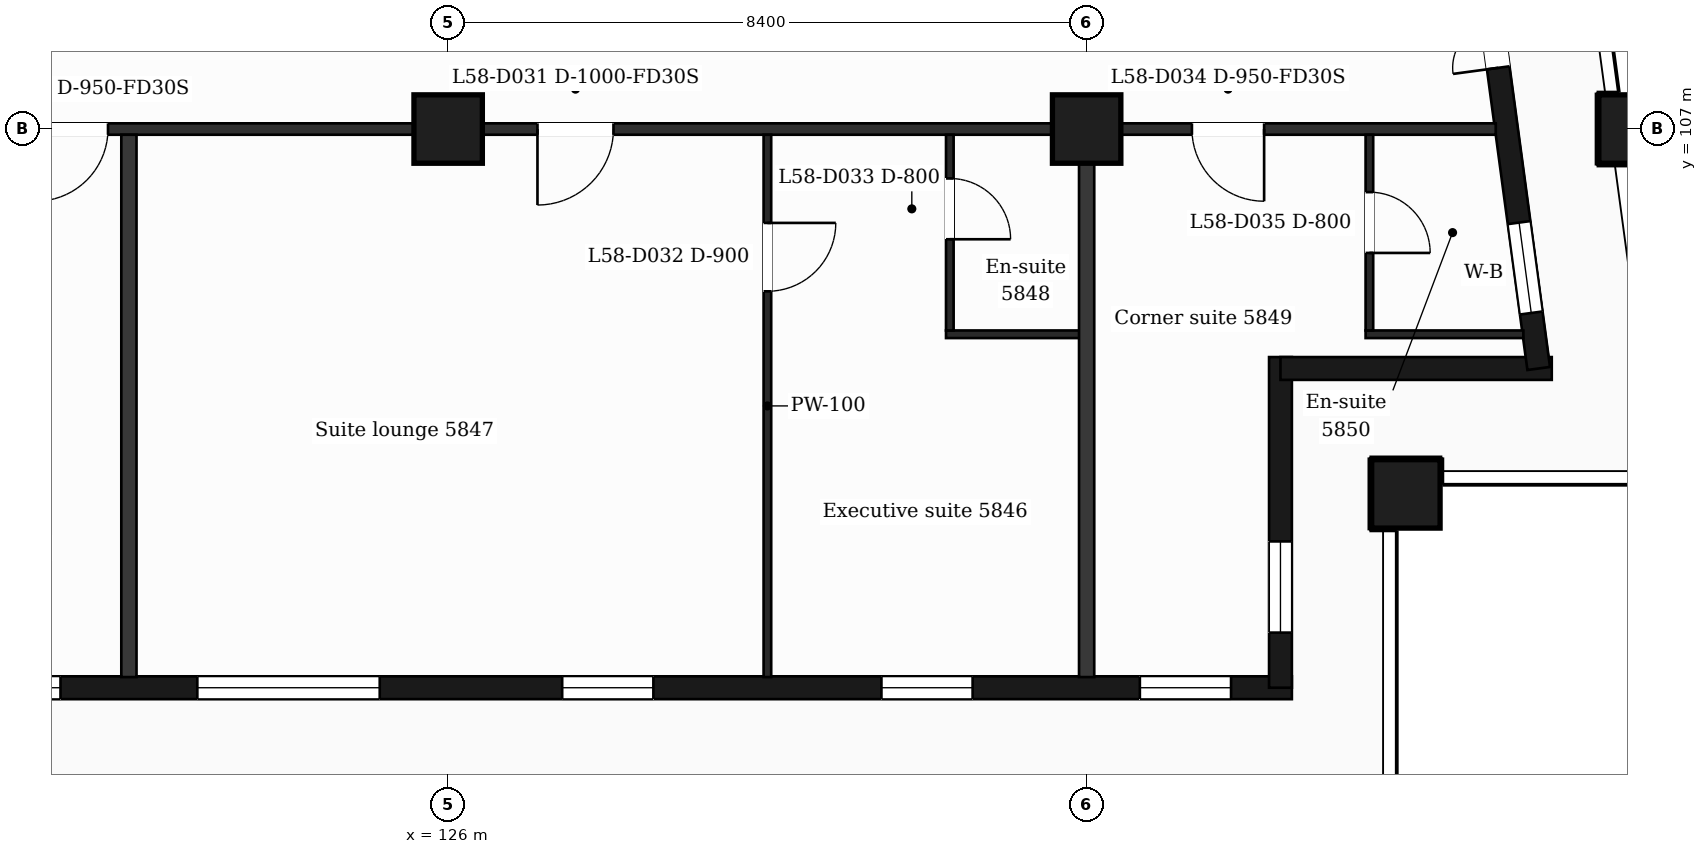
"""IFC4 building model, lengths in metres.
Left out: names, types, materials, properties, quantities, classifications, styles, units other than length and angle.
Written with IfcOpenShell. Run it as: python <this file> out.ifc"""

import sys

from ifc_helpers import new_model, si_unit, direction, frame, frame_2d, origin, origin_2d, place, context, subcontext, project, spatial, rectangle, extrude, element, fill, save


model = new_model("IFC4")
c1 = context("Model", 3, precision=1e-05, world=origin(), true_north=direction((0.0, 1.0)))
c2 = subcontext(c1, "Body", "Model", "MODEL_VIEW")
j1 = project(units=[si_unit("LENGTHUNIT", "METRE"), si_unit("PLANEANGLEUNIT", "RADIAN")], contexts=[c1])
p1 = place(None, origin())
s1 = spatial("IfcSite", under=j1, at=p1, CompositionType="ELEMENT")
p2 = place(p1, origin())
s2 = spatial("IfcBuilding", under=s1, at=p2, CompositionType="ELEMENT")
p3 = place(p2, frame((0.0, 0.0, 239.2)))
s3 = spatial("IfcBuildingStorey", under=s2, at=p3, CompositionType="ELEMENT", Elevation=239.2)
for number, where, z_axis, x_axis in (
    (1, (138.6, 102.2, 0.0), (0.0, 0.0, 1.0), (1.0, 0.0, 0.0)),
    (2, (126.0, 107.0, 0.0), (0.0, 0.0, 1.0), (1.0, 0.0, 0.0)),
    (3, (134.4, 107.0, 0.0), (0.0, 0.0, 1.0), (1.0, 0.0, 0.0)),
    (4, (141.588, 107.0, 0.0), (0.0, 0.0, 1.0), (1.0, 0.0, 0.0)),
):
    element("IfcColumn", number, at=place(p3, frame(where, z_axis=z_axis, x_axis=x_axis)), inside=s3, PredefinedType="COLUMN", context=c2, shape_type="SweptSolid", body=[
        extrude(rectangle(XDim=0.9, YDim=0.9, at=origin_2d()), origin(), (0.0, 0.0, 1.0), 3.7),
    ])
p4 = place(p3, frame((89.85, 99.65, 0.0), z_axis=(0.0, 0.0, 1.0), x_axis=(1.0, 0.0, 0.0)))
e5 = element("IfcWall", 5, at=p4, inside=s3, PredefinedType="SOLIDWALL", context=c2, shape_type="SweptSolid", body=[
    extrude(rectangle(XDim=47.25, YDim=0.3, at=frame_2d((23.625, 0.0))), origin(), (0.0, 0.0, 1.0), 3.38),
])
p5 = place(p4, frame((0.725, 0.0, 0.9)))
e6 = element("IfcOpeningElement", 6, at=p5, cuts=e5, PredefinedType="OPENING", context=c2, shape_type="SweptSolid", body=[
    extrude(rectangle(XDim=1.2, YDim=2.1, at=frame_2d((0.6, 1.05))), frame((0.0, 0.16, 0.0), z_axis=(0.0, -1.0, 0.0), x_axis=(1.0, 0.0, 0.0)), (0.0, 0.0, 1.0), 0.32),
])
p6 = place(p4, frame((3.45, 0.0, 0.9)))
e7 = element("IfcOpeningElement", 7, at=p6, cuts=e5, PredefinedType="OPENING", context=c2, shape_type="SweptSolid", body=[
    extrude(rectangle(XDim=2.4, YDim=2.1, at=frame_2d((1.2, 1.05))), frame((0.0, 0.16, 0.0), z_axis=(0.0, -1.0, 0.0), x_axis=(1.0, 0.0, 0.0)), (0.0, 0.0, 1.0), 0.32),
])
p7 = place(p4, frame((8.25, 0.0, 0.9)))
e8 = element("IfcOpeningElement", 8, at=p7, cuts=e5, PredefinedType="OPENING", context=c2, shape_type="SweptSolid", body=[
    extrude(rectangle(XDim=1.2, YDim=2.1, at=frame_2d((0.6, 1.05))), frame((0.0, 0.16, 0.0), z_axis=(0.0, -1.0, 0.0), x_axis=(1.0, 0.0, 0.0)), (0.0, 0.0, 1.0), 0.32),
])
p8 = place(p4, frame((12.45, 0.0, 0.9)))
e9 = element("IfcOpeningElement", 9, at=p8, cuts=e5, PredefinedType="OPENING", context=c2, shape_type="SweptSolid", body=[
    extrude(rectangle(XDim=1.2, YDim=2.1, at=frame_2d((0.6, 1.05))), frame((0.0, 0.16, 0.0), z_axis=(0.0, -1.0, 0.0), x_axis=(1.0, 0.0, 0.0)), (0.0, 0.0, 1.0), 0.32),
])
p9 = place(p4, frame((16.05, 0.0, 0.9)))
e10 = element("IfcOpeningElement", 10, at=p9, cuts=e5, PredefinedType="OPENING", context=c2, shape_type="SweptSolid", body=[
    extrude(rectangle(XDim=2.4, YDim=2.1, at=frame_2d((1.2, 1.05))), frame((0.0, 0.16, 0.0), z_axis=(0.0, -1.0, 0.0), x_axis=(1.0, 0.0, 0.0)), (0.0, 0.0, 1.0), 0.32),
])
p10 = place(p4, frame((20.25, 0.0, 0.9)))
e11 = element("IfcOpeningElement", 11, at=p10, cuts=e5, PredefinedType="OPENING", context=c2, shape_type="SweptSolid", body=[
    extrude(rectangle(XDim=2.4, YDim=2.1, at=frame_2d((1.2, 1.05))), frame((0.0, 0.16, 0.0), z_axis=(0.0, -1.0, 0.0), x_axis=(1.0, 0.0, 0.0)), (0.0, 0.0, 1.0), 0.32),
])
p11 = place(p4, frame((25.05, 0.0, 0.0)))
e12 = element("IfcOpeningElement", 12, at=p11, cuts=e5, PredefinedType="OPENING", context=c2, shape_type="SweptSolid", body=[
    extrude(rectangle(XDim=1.2, YDim=2.4, at=frame_2d((0.6, 1.2))), frame((0.0, 0.16, 0.0), z_axis=(0.0, -1.0, 0.0), x_axis=(1.0, 0.0, 0.0)), (0.0, 0.0, 1.0), 0.32),
])
p12 = place(p4, frame((28.65, 0.0, 0.9)))
e13 = element("IfcOpeningElement", 13, at=p12, cuts=e5, PredefinedType="OPENING", context=c2, shape_type="SweptSolid", body=[
    extrude(rectangle(XDim=2.4, YDim=2.1, at=frame_2d((1.2, 1.05))), frame((0.0, 0.16, 0.0), z_axis=(0.0, -1.0, 0.0), x_axis=(1.0, 0.0, 0.0)), (0.0, 0.0, 1.0), 0.32),
])
p13 = place(p4, frame((32.85, 0.0, 0.9)))
e14 = element("IfcOpeningElement", 14, at=p13, cuts=e5, PredefinedType="OPENING", context=c2, shape_type="SweptSolid", body=[
    extrude(rectangle(XDim=2.4, YDim=2.1, at=frame_2d((1.2, 1.05))), frame((0.0, 0.16, 0.0), z_axis=(0.0, -1.0, 0.0), x_axis=(1.0, 0.0, 0.0)), (0.0, 0.0, 1.0), 0.32),
])
p14 = place(p4, frame((37.65, 0.0, 0.9)))
e15 = element("IfcOpeningElement", 15, at=p14, cuts=e5, PredefinedType="OPENING", context=c2, shape_type="SweptSolid", body=[
    extrude(rectangle(XDim=1.2, YDim=2.1, at=frame_2d((0.6, 1.05))), frame((0.0, 0.16, 0.0), z_axis=(0.0, -1.0, 0.0), x_axis=(1.0, 0.0, 0.0)), (0.0, 0.0, 1.0), 0.32),
])
p15 = place(p4, frame((41.85, 0.0, 0.9)))
e16 = element("IfcOpeningElement", 16, at=p15, cuts=e5, PredefinedType="OPENING", context=c2, shape_type="SweptSolid", body=[
    extrude(rectangle(XDim=1.2, YDim=2.1, at=frame_2d((0.6, 1.05))), frame((0.0, 0.16, 0.0), z_axis=(0.0, -1.0, 0.0), x_axis=(1.0, 0.0, 0.0)), (0.0, 0.0, 1.0), 0.32),
])
p16 = place(p4, frame((45.25, 0.0, 0.9)))
e17 = element("IfcOpeningElement", 17, at=p16, cuts=e5, PredefinedType="OPENING", context=c2, shape_type="SweptSolid", body=[
    extrude(rectangle(XDim=1.2, YDim=2.1, at=frame_2d((0.6, 1.05))), frame((0.0, 0.16, 0.0), z_axis=(0.0, -1.0, 0.0), x_axis=(1.0, 0.0, 0.0)), (0.0, 0.0, 1.0), 0.32),
])
p17 = place(p3, frame((136.95, 99.65, 0.0), z_axis=(0.0, 0.0, 1.0), x_axis=(0.0, 1.0, 0.0)))
e18 = element("IfcWall", 18, at=p17, inside=s3, PredefinedType="SOLIDWALL", context=c2, shape_type="SweptSolid", body=[
    extrude(rectangle(XDim=4.35, YDim=0.3, at=frame_2d((2.175, 0.0))), origin(), (0.0, 0.0, 1.0), 3.38),
])
p18 = place(p17, frame((0.725, 0.0, 0.9)))
e19 = element("IfcOpeningElement", 19, at=p18, cuts=e18, PredefinedType="OPENING", context=c2, shape_type="SweptSolid", body=[
    extrude(rectangle(XDim=1.2, YDim=2.1, at=frame_2d((0.6, 1.05))), frame((0.0, 0.16, 0.0), z_axis=(0.0, -1.0, 0.0), x_axis=(1.0, 0.0, 0.0)), (0.0, 0.0, 1.0), 0.32),
])
p19 = place(p3, frame((136.95, 103.85, 0.0), z_axis=(0.0, 0.0, 1.0), x_axis=(1.0, 0.0, 0.0)))
e20 = element("IfcWall", 20, at=p19, inside=s3, PredefinedType="SOLIDWALL", context=c2, shape_type="SweptSolid", body=[
    extrude(rectangle(XDim=3.569, YDim=0.3, at=frame_2d((1.785, 0.0))), origin(), (0.0, 0.0, 1.0), 3.38),
])
p20 = place(p3, frame((140.348, 103.85, 0.0), z_axis=(0.0, 0.0, 1.0), x_axis=(-0.133431549479, 0.991058031401, 0.0)))
e21 = element("IfcWall", 21, at=p20, inside=s3, PredefinedType="SOLIDWALL", context=c2, shape_type="SweptSolid", body=[
    extrude(rectangle(XDim=6.609, YDim=0.3, at=frame_2d((3.304, 0.0))), origin(), (0.0, 0.0, 1.0), 3.38),
])
p21 = place(p20, frame((0.737, 0.0, 0.9)))
e22 = element("IfcOpeningElement", 22, at=p21, cuts=e21, PredefinedType="OPENING", context=c2, shape_type="SweptSolid", body=[
    extrude(rectangle(XDim=1.2, YDim=2.1, at=frame_2d((0.6, 1.05))), frame((0.0, 0.16, 0.0), z_axis=(0.0, -1.0, 0.0), x_axis=(1.0, 0.0, 0.0)), (0.0, 0.0, 1.0), 0.32),
])
p22 = place(p20, frame((3.991, 0.0, 0.0)))
e23 = element("IfcOpeningElement", 23, at=p22, cuts=e21, PredefinedType="OPENING", context=c2, shape_type="SweptSolid", body=[
    extrude(rectangle(XDim=1.2, YDim=2.4, at=frame_2d((0.6, 1.2))), frame((0.0, 0.16, 0.0), z_axis=(0.0, -1.0, 0.0), x_axis=(1.0, 0.0, 0.0)), (0.0, 0.0, 1.0), 0.32),
])
p23 = place(p3, frame((132.55, 104.3, 0.0), z_axis=(0.0, 0.0, 1.0), x_axis=(1.0, 0.0, 0.0)))
e24 = element("IfcWall", 24, at=p23, inside=s3, PredefinedType="PARTITIONING", context=c2, shape_type="SweptSolid", body=[
    extrude(rectangle(XDim=1.85, YDim=0.1, at=frame_2d((0.925, 0.0))), origin(), (0.0, 0.0, 1.0), 3.38),
])
p24 = place(p3, frame((138.07, 104.3, 0.0), z_axis=(0.0, 0.0, 1.0), x_axis=(1.0, 0.0, 0.0)))
e25 = element("IfcWall", 25, at=p24, inside=s3, PredefinedType="PARTITIONING", context=c2, shape_type="SweptSolid", body=[
    extrude(rectangle(XDim=2.076, YDim=0.1, at=frame_2d((1.038, 0.0))), origin(), (0.0, 0.0, 1.0), 3.38),
])
p25 = place(p3, frame((87.018, 107.0, 0.0), z_axis=(0.0, 0.0, 1.0), x_axis=(1.0, 0.0, 0.0)))
e26 = element("IfcWall", 26, at=p25, inside=s3, PredefinedType="PARTITIONING", context=c2, shape_type="SweptSolid", body=[
    extrude(rectangle(XDim=52.765, YDim=0.15, at=frame_2d((26.382, 0.0))), origin(), (0.0, 0.0, 1.0), 3.38),
])
p26 = place(p25, frame((0.87, 0.0, 0.0)))
e27 = element("IfcOpeningElement", 27, at=p26, cuts=e26, PredefinedType="OPENING", context=c2, shape_type="SweptSolid", body=[
    extrude(rectangle(XDim=0.95, YDim=2.1, at=frame_2d((0.475, 1.05))), frame((0.0, 0.085, 0.0), z_axis=(0.0, -1.0, 0.0), x_axis=(1.0, 0.0, 0.0)), (0.0, 0.0, 1.0), 0.17),
])
p27 = place(p25, frame((7.757, 0.0, 0.0)))
e28 = element("IfcOpeningElement", 28, at=p27, cuts=e26, PredefinedType="OPENING", context=c2, shape_type="SweptSolid", body=[
    extrude(rectangle(XDim=0.95, YDim=2.1, at=frame_2d((0.475, 1.05))), frame((0.0, 0.085, 0.0), z_axis=(0.0, -1.0, 0.0), x_axis=(1.0, 0.0, 0.0)), (0.0, 0.0, 1.0), 0.17),
])
p28 = place(p25, frame((16.57, 0.0, 0.0)))
e29 = element("IfcOpeningElement", 29, at=p28, cuts=e26, PredefinedType="OPENING", context=c2, shape_type="SweptSolid", body=[
    extrude(rectangle(XDim=0.95, YDim=2.1, at=frame_2d((0.475, 1.05))), frame((0.0, 0.085, 0.0), z_axis=(0.0, -1.0, 0.0), x_axis=(1.0, 0.0, 0.0)), (0.0, 0.0, 1.0), 0.17),
])
p29 = place(p25, frame((18.782, 0.0, 0.0)))
e30 = element("IfcOpeningElement", 30, at=p29, cuts=e26, PredefinedType="OPENING", context=c2, shape_type="SweptSolid", body=[
    extrude(rectangle(XDim=0.95, YDim=2.1, at=frame_2d((0.475, 1.05))), frame((0.0, 0.085, 0.0), z_axis=(0.0, -1.0, 0.0), x_axis=(1.0, 0.0, 0.0)), (0.0, 0.0, 1.0), 0.17),
])
p30 = place(p25, frame((24.519, 0.0, 0.0)))
e31 = element("IfcOpeningElement", 31, at=p30, cuts=e26, PredefinedType="OPENING", context=c2, shape_type="SweptSolid", body=[
    extrude(rectangle(XDim=0.95, YDim=2.1, at=frame_2d((0.475, 1.05))), frame((0.0, 0.085, 0.0), z_axis=(0.0, -1.0, 0.0), x_axis=(1.0, 0.0, 0.0)), (0.0, 0.0, 1.0), 0.17),
])
p31 = place(p25, frame((26.919, 0.0, 0.0)))
e32 = element("IfcOpeningElement", 32, at=p31, cuts=e26, PredefinedType="OPENING", context=c2, shape_type="SweptSolid", body=[
    extrude(rectangle(XDim=0.95, YDim=2.1, at=frame_2d((0.475, 1.05))), frame((0.0, 0.085, 0.0), z_axis=(0.0, -1.0, 0.0), x_axis=(1.0, 0.0, 0.0)), (0.0, 0.0, 1.0), 0.17),
])
p32 = place(p25, frame((33.557, 0.0, 0.0)))
e33 = element("IfcOpeningElement", 33, at=p32, cuts=e26, PredefinedType="OPENING", context=c2, shape_type="SweptSolid", body=[
    extrude(rectangle(XDim=0.95, YDim=2.1, at=frame_2d((0.475, 1.05))), frame((0.0, 0.085, 0.0), z_axis=(0.0, -1.0, 0.0), x_axis=(1.0, 0.0, 0.0)), (0.0, 0.0, 1.0), 0.17),
])
p33 = place(p25, frame((40.157, 0.0, 0.0)))
e34 = element("IfcOpeningElement", 34, at=p33, cuts=e26, PredefinedType="OPENING", context=c2, shape_type="SweptSolid", body=[
    extrude(rectangle(XDim=1.0, YDim=2.1, at=frame_2d((0.5, 1.05))), frame((0.0, 0.085, 0.0), z_axis=(0.0, -1.0, 0.0), x_axis=(1.0, 0.0, 0.0)), (0.0, 0.0, 1.0), 0.17),
])
p34 = place(p25, frame((48.767, 0.0, 0.0)))
e35 = element("IfcOpeningElement", 35, at=p34, cuts=e26, PredefinedType="OPENING", context=c2, shape_type="SweptSolid", body=[
    extrude(rectangle(XDim=0.95, YDim=2.1, at=frame_2d((0.475, 1.05))), frame((0.0, 0.085, 0.0), z_axis=(0.0, -1.0, 0.0), x_axis=(1.0, 0.0, 0.0)), (0.0, 0.0, 1.0), 0.17),
])
p35 = place(p3, frame((121.8, 99.79, 0.0), z_axis=(0.0, 0.0, 1.0), x_axis=(0.0, 1.0, 0.0)))
e36 = element("IfcWall", 36, at=p35, inside=s3, PredefinedType="PARTITIONING", context=c2, shape_type="SweptSolid", body=[
    extrude(rectangle(XDim=7.135, YDim=0.2, at=frame_2d((3.567, 0.0))), origin(), (0.0, 0.0, 1.0), 3.38),
])
p36 = place(p3, frame((130.2, 99.79, 0.0), z_axis=(0.0, 0.0, 1.0), x_axis=(0.0, 1.0, 0.0)))
e37 = element("IfcWall", 37, at=p36, inside=s3, PredefinedType="PARTITIONING", context=c2, shape_type="SweptSolid", body=[
    extrude(rectangle(XDim=7.135, YDim=0.1, at=frame_2d((3.567, 0.0))), origin(), (0.0, 0.0, 1.0), 3.38),
])
p37 = place(p36, frame((5.075, 0.0, 0.0)))
e38 = element("IfcOpeningElement", 38, at=p37, cuts=e37, PredefinedType="OPENING", context=c2, shape_type="SweptSolid", body=[
    extrude(rectangle(XDim=0.9, YDim=2.1, at=frame_2d((0.45, 1.05))), frame((0.0, 0.06, 0.0), z_axis=(0.0, -1.0, 0.0), x_axis=(1.0, 0.0, 0.0)), (0.0, 0.0, 1.0), 0.12),
])
p38 = place(p3, frame((132.6, 104.35, 0.0), z_axis=(0.0, 0.0, 1.0), x_axis=(0.0, 1.0, 0.0)))
e39 = element("IfcWall", 39, at=p38, inside=s3, PredefinedType="PARTITIONING", context=c2, shape_type="SweptSolid", body=[
    extrude(rectangle(XDim=2.575, YDim=0.1, at=frame_2d((1.288, 0.0))), origin(), (0.0, 0.0, 1.0), 3.38),
])
p39 = place(p38, frame((1.2, 0.0, 0.0)))
e40 = element("IfcOpeningElement", 40, at=p39, cuts=e39, PredefinedType="OPENING", context=c2, shape_type="SweptSolid", body=[
    extrude(rectangle(XDim=0.8, YDim=2.1, at=frame_2d((0.4, 1.05))), frame((0.0, 0.06, 0.0), z_axis=(0.0, -1.0, 0.0), x_axis=(1.0, 0.0, 0.0)), (0.0, 0.0, 1.0), 0.12),
])
p40 = place(p3, frame((134.4, 99.79, 0.0), z_axis=(0.0, 0.0, 1.0), x_axis=(0.0, 1.0, 0.0)))
e41 = element("IfcWall", 41, at=p40, inside=s3, PredefinedType="PARTITIONING", context=c2, shape_type="SweptSolid", body=[
    extrude(rectangle(XDim=7.135, YDim=0.2, at=frame_2d((3.567, 0.0))), origin(), (0.0, 0.0, 1.0), 3.38),
])
p41 = place(p3, frame((138.12, 104.35, 0.0), z_axis=(0.0, 0.0, 1.0), x_axis=(0.0, 1.0, 0.0)))
e42 = element("IfcWall", 42, at=p41, inside=s3, PredefinedType="PARTITIONING", context=c2, shape_type="SweptSolid", body=[
    extrude(rectangle(XDim=2.575, YDim=0.1, at=frame_2d((1.288, 0.0))), origin(), (0.0, 0.0, 1.0), 3.38),
])
p42 = place(p41, frame((1.02, 0.0, 0.0)))
e43 = element("IfcOpeningElement", 43, at=p42, cuts=e42, PredefinedType="OPENING", context=c2, shape_type="SweptSolid", body=[
    extrude(rectangle(XDim=0.8, YDim=2.1, at=frame_2d((0.4, 1.05))), frame((0.0, 0.06, 0.0), z_axis=(0.0, -1.0, 0.0), x_axis=(1.0, 0.0, 0.0)), (0.0, 0.0, 1.0), 0.12),
])
p43 = place(p12, origin())
e44 = element("IfcWindow", 44, at=p43, inside=s3, PartitioningType="SINGLE_PANEL", PredefinedType="WINDOW", context=c2, shape_type="SweptSolid", body=[
    extrude(rectangle(XDim=2.4, YDim=2.1, at=frame_2d((1.2, 1.05))), frame((0.0, 0.03, 0.0), z_axis=(0.0, -1.0, 0.0), x_axis=(1.0, 0.0, 0.0)), (0.0, 0.0, 1.0), 0.06),
])
fill(e13, e44)
p44 = place(p13, origin())
e45 = element("IfcWindow", 45, at=p44, inside=s3, PartitioningType="SINGLE_PANEL", PredefinedType="WINDOW", context=c2, shape_type="SweptSolid", body=[
    extrude(rectangle(XDim=2.4, YDim=2.1, at=frame_2d((1.2, 1.05))), frame((0.0, 0.03, 0.0), z_axis=(0.0, -1.0, 0.0), x_axis=(1.0, 0.0, 0.0)), (0.0, 0.0, 1.0), 0.06),
])
fill(e14, e45)
p45 = place(p14, origin())
e46 = element("IfcWindow", 46, at=p45, inside=s3, PartitioningType="SINGLE_PANEL", PredefinedType="WINDOW", context=c2, shape_type="SweptSolid", body=[
    extrude(rectangle(XDim=1.2, YDim=2.1, at=frame_2d((0.6, 1.05))), frame((0.0, 0.03, 0.0), z_axis=(0.0, -1.0, 0.0), x_axis=(1.0, 0.0, 0.0)), (0.0, 0.0, 1.0), 0.06),
])
fill(e15, e46)
p46 = place(p15, origin())
e47 = element("IfcWindow", 47, at=p46, inside=s3, PartitioningType="SINGLE_PANEL", PredefinedType="WINDOW", context=c2, shape_type="SweptSolid", body=[
    extrude(rectangle(XDim=1.2, YDim=2.1, at=frame_2d((0.6, 1.05))), frame((0.0, 0.03, 0.0), z_axis=(0.0, -1.0, 0.0), x_axis=(1.0, 0.0, 0.0)), (0.0, 0.0, 1.0), 0.06),
])
fill(e16, e47)
p47 = place(p16, origin())
e48 = element("IfcWindow", 48, at=p47, inside=s3, PartitioningType="SINGLE_PANEL", PredefinedType="WINDOW", context=c2, shape_type="SweptSolid", body=[
    extrude(rectangle(XDim=1.2, YDim=2.1, at=frame_2d((0.6, 1.05))), frame((0.0, 0.03, 0.0), z_axis=(0.0, -1.0, 0.0), x_axis=(1.0, 0.0, 0.0)), (0.0, 0.0, 1.0), 0.06),
])
fill(e17, e48)
p48 = place(p18, origin())
e49 = element("IfcWindow", 49, at=p48, inside=s3, PartitioningType="SINGLE_PANEL", PredefinedType="WINDOW", context=c2, shape_type="SweptSolid", body=[
    extrude(rectangle(XDim=1.2, YDim=2.1, at=frame_2d((0.6, 1.05))), frame((0.0, 0.03, 0.0), z_axis=(0.0, -1.0, 0.0), x_axis=(1.0, 0.0, 0.0)), (0.0, 0.0, 1.0), 0.06),
])
fill(e19, e49)
p49 = place(p21, origin())
e50 = element("IfcWindow", 50, at=p49, inside=s3, PartitioningType="SINGLE_PANEL", PredefinedType="WINDOW", context=c2, shape_type="SweptSolid", body=[
    extrude(rectangle(XDim=1.2, YDim=2.1, at=frame_2d((0.6, 1.05))), frame((0.0, 0.03, 0.0), z_axis=(0.0, -1.0, 0.0), x_axis=(1.0, 0.0, 0.0)), (0.0, 0.0, 1.0), 0.06),
])
fill(e22, e50)
p50 = place(p22, origin())
e51 = element("IfcDoor", 51, at=p50, inside=s3, OperationType="DOUBLE_DOOR_SINGLE_SWING", PredefinedType="DOOR", context=c2, shape_type="SweptSolid", body=[
    extrude(rectangle(XDim=1.2, YDim=2.4, at=frame_2d((0.6, 1.2))), frame((0.0, 0.025, 0.0), z_axis=(0.0, -1.0, 0.0), x_axis=(1.0, 0.0, 0.0)), (0.0, 0.0, 1.0), 0.05),
])
fill(e23, e51)
p51 = place(p32, origin())
e52 = element("IfcDoor", 52, at=p51, inside=s3, OperationType="SINGLE_SWING_LEFT", PredefinedType="DOOR", context=c2, shape_type="SweptSolid", body=[
    extrude(rectangle(XDim=0.95, YDim=2.1, at=frame_2d((0.475, 1.05))), frame((0.0, 0.025, 0.0), z_axis=(0.0, -1.0, 0.0), x_axis=(1.0, 0.0, 0.0)), (0.0, 0.0, 1.0), 0.05),
])
fill(e33, e52)
p52 = place(p33, origin())
e53 = element("IfcDoor", 53, at=p52, inside=s3, OperationType="SINGLE_SWING_LEFT", PredefinedType="DOOR", context=c2, shape_type="SweptSolid", body=[
    extrude(rectangle(XDim=1.0, YDim=2.1, at=frame_2d((0.5, 1.05))), frame((0.0, 0.025, 0.0), z_axis=(0.0, -1.0, 0.0), x_axis=(1.0, 0.0, 0.0)), (0.0, 0.0, 1.0), 0.05),
])
fill(e34, e53)
p53 = place(p37, origin())
e54 = element("IfcDoor", 54, at=p53, inside=s3, OperationType="SINGLE_SWING_RIGHT", PredefinedType="DOOR", context=c2, shape_type="SweptSolid", body=[
    extrude(rectangle(XDim=0.9, YDim=2.1, at=frame_2d((0.45, 1.05))), frame((0.0, 0.025, 0.0), z_axis=(0.0, -1.0, 0.0), x_axis=(1.0, 0.0, 0.0)), (0.0, 0.0, 1.0), 0.05),
])
fill(e38, e54)
p54 = place(p39, origin())
e55 = element("IfcDoor", 55, at=p54, inside=s3, OperationType="SINGLE_SWING_LEFT", PredefinedType="DOOR", context=c2, shape_type="SweptSolid", body=[
    extrude(rectangle(XDim=0.8, YDim=2.1, at=frame_2d((0.4, 1.05))), frame((0.0, 0.025, 0.0), z_axis=(0.0, -1.0, 0.0), x_axis=(1.0, 0.0, 0.0)), (0.0, 0.0, 1.0), 0.05),
])
fill(e40, e55)
p55 = place(p34, origin())
e56 = element("IfcDoor", 56, at=p55, inside=s3, OperationType="SINGLE_SWING_RIGHT", PredefinedType="DOOR", context=c2, shape_type="SweptSolid", body=[
    extrude(rectangle(XDim=0.95, YDim=2.1, at=frame_2d((0.475, 1.05))), frame((0.0, 0.025, 0.0), z_axis=(0.0, -1.0, 0.0), x_axis=(1.0, 0.0, 0.0)), (0.0, 0.0, 1.0), 0.05),
])
fill(e35, e56)
p56 = place(p42, origin())
e57 = element("IfcDoor", 57, at=p56, inside=s3, OperationType="SINGLE_SWING_LEFT", PredefinedType="DOOR", context=c2, shape_type="SweptSolid", body=[
    extrude(rectangle(XDim=0.8, YDim=2.1, at=frame_2d((0.4, 1.05))), frame((0.0, 0.025, 0.0), z_axis=(0.0, -1.0, 0.0), x_axis=(1.0, 0.0, 0.0)), (0.0, 0.0, 1.0), 0.05),
])
fill(e43, e57)
save(model, sys.argv[1])
